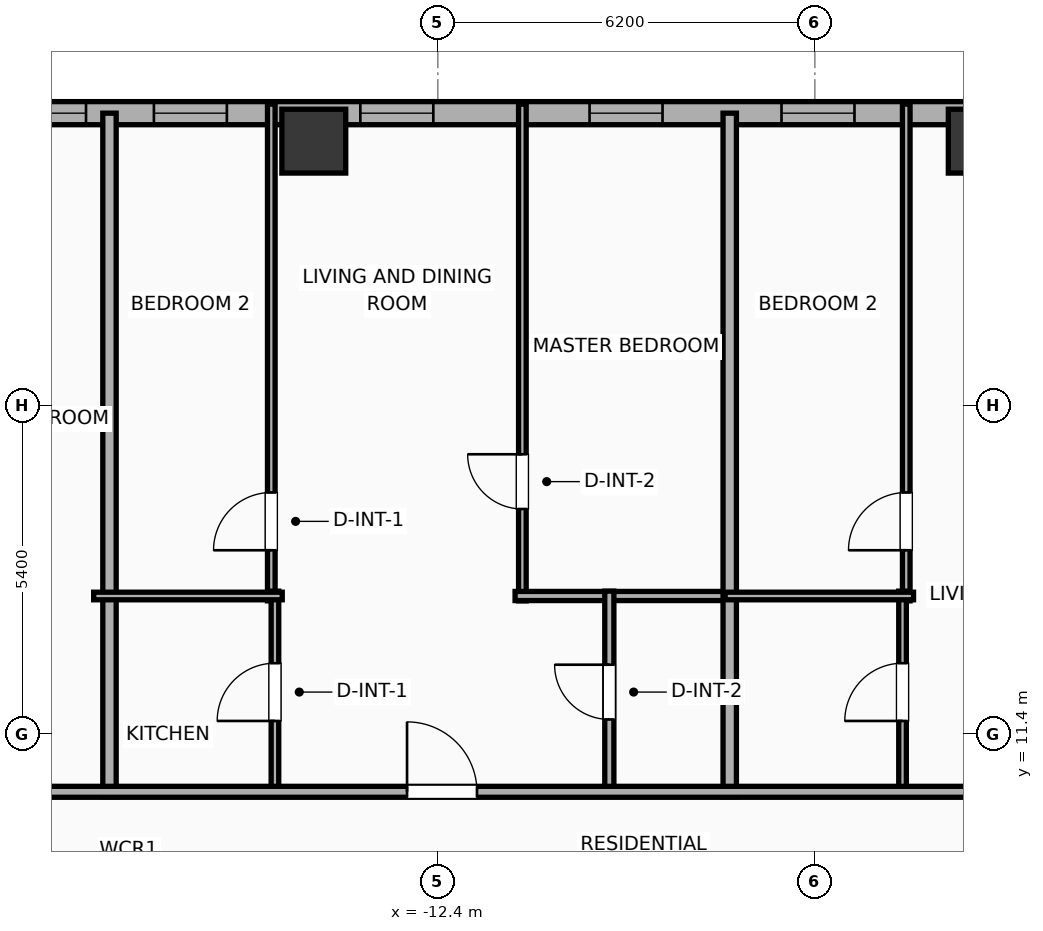
"""IFC4 building model, lengths in metres.
Left out: names, types, materials, properties, quantities, classifications, styles, units other than length and angle.
Written with IfcOpenShell. Run it as: python <this file> out.ifc"""

import sys

from ifc_helpers import new_model, si_unit, direction, frame, frame_2d, origin, origin_2d, place, context, subcontext, project, spatial, rectangle, hollow_rectangle, extrude, element, fill, save


model = new_model("IFC4")
c1 = context("Model", 3, precision=1e-05, world=origin(), true_north=direction((0.0, 1.0)))
c2 = subcontext(c1, "Body", "Model", "MODEL_VIEW")
j1 = project(units=[si_unit("LENGTHUNIT", "METRE"), si_unit("PLANEANGLEUNIT", "RADIAN")], contexts=[c1])
p1 = place(None, origin())
s1 = spatial("IfcSite", under=j1, at=p1, CompositionType="ELEMENT")
p2 = place(p1, origin())
s2 = spatial("IfcBuilding", under=s1, at=p2, CompositionType="ELEMENT")
p3 = place(p2, frame((0.0, 0.0, 93.6)))
s3 = spatial("IfcBuildingStorey", under=s2, at=p3, CompositionType="ELEMENT", Elevation=93.6)
for number, where, z_axis, x_axis in (
    (1, (-3.48, 21.15, 0.0), (0.0, 0.0, 1.0), (1.0, 0.0, 0.0)),
    (2, (-14.44, 21.15, 0.0), (0.0, 0.0, 1.0), (1.0, 0.0, 0.0)),
):
    element("IfcColumn", number, at=place(p3, frame(where, z_axis=z_axis, x_axis=x_axis)), inside=s3, PredefinedType="COLUMN", context=c2, shape_type="SweptSolid", body=[
        extrude(hollow_rectangle(XDim=1.05, YDim=1.05, WallThickness=0.036, at=origin_2d()), origin(), (0.0, 0.0, 1.0), 3.9),
    ])
p4 = place(p3, frame((-25.381, 21.61, 0.0), z_axis=(0.0, 0.0, 1.0), x_axis=(1.0, 0.0, 0.0)))
e3 = element("IfcWall", 3, at=p4, inside=s3, PredefinedType="ELEMENTEDWALL", context=c2, shape_type="SweptSolid", body=[
    extrude(rectangle(XDim=54.763, YDim=0.38, at=frame_2d((27.381, 0.0))), origin(), (0.0, 0.0, 1.0), 3.65),
])
p5 = place(p4, frame((4.795, 0.0, 0.75)))
e4 = element("IfcOpeningElement", 4, at=p5, cuts=e3, PredefinedType="OPENING", context=c2, shape_type="SweptSolid", body=[
    extrude(rectangle(XDim=2.4, YDim=2.1, at=frame_2d((1.2, 1.05))), frame((0.0, 0.2, 0.0), z_axis=(0.0, -1.0, 0.0), x_axis=(1.0, 0.0, 0.0)), (0.0, 0.0, 1.0), 0.4),
])
p6 = place(p4, frame((2.377, 0.0, 0.75)))
e5 = element("IfcOpeningElement", 5, at=p6, cuts=e3, PredefinedType="OPENING", context=c2, shape_type="SweptSolid", body=[
    extrude(rectangle(XDim=1.2, YDim=2.05, at=frame_2d((0.6, 1.025))), frame((0.0, 0.2, 0.0), z_axis=(0.0, -1.0, 0.0), x_axis=(1.0, 0.0, 0.0)), (0.0, 0.0, 1.0), 0.4),
])
p7 = place(p4, frame((11.707, 0.0, 0.75)))
e6 = element("IfcOpeningElement", 6, at=p7, cuts=e3, PredefinedType="OPENING", context=c2, shape_type="SweptSolid", body=[
    extrude(rectangle(XDim=1.2, YDim=2.05, at=frame_2d((0.6, 1.025))), frame((0.0, 0.2, 0.0), z_axis=(0.0, -1.0, 0.0), x_axis=(1.0, 0.0, 0.0)), (0.0, 0.0, 1.0), 0.4),
])
p8 = place(p4, frame((8.312, 0.0, 0.75)))
e7 = element("IfcOpeningElement", 7, at=p8, cuts=e3, PredefinedType="OPENING", context=c2, shape_type="SweptSolid", body=[
    extrude(rectangle(XDim=1.2, YDim=2.05, at=frame_2d((0.6, 1.025))), frame((0.0, 0.2, 0.0), z_axis=(0.0, -1.0, 0.0), x_axis=(1.0, 0.0, 0.0)), (0.0, 0.0, 1.0), 0.4),
])
p9 = place(p4, frame((15.476, 0.0, 0.75)))
e8 = element("IfcOpeningElement", 8, at=p9, cuts=e3, PredefinedType="OPENING", context=c2, shape_type="SweptSolid", body=[
    extrude(rectangle(XDim=1.2, YDim=2.05, at=frame_2d((0.6, 1.025))), frame((0.0, 0.2, 0.0), z_axis=(0.0, -1.0, 0.0), x_axis=(1.0, 0.0, 0.0)), (0.0, 0.0, 1.0), 0.4),
])
p10 = place(p4, frame((22.628, 0.0, 0.75)))
e9 = element("IfcOpeningElement", 9, at=p10, cuts=e3, PredefinedType="OPENING", context=c2, shape_type="SweptSolid", body=[
    extrude(rectangle(XDim=1.2, YDim=2.05, at=frame_2d((0.6, 1.025))), frame((0.0, 0.2, 0.0), z_axis=(0.0, -1.0, 0.0), x_axis=(1.0, 0.0, 0.0)), (0.0, 0.0, 1.0), 0.4),
])
p11 = place(p4, frame((18.633, 0.0, 0.75)))
e10 = element("IfcOpeningElement", 10, at=p11, cuts=e3, PredefinedType="OPENING", context=c2, shape_type="SweptSolid", body=[
    extrude(rectangle(XDim=1.2, YDim=2.05, at=frame_2d((0.6, 1.025))), frame((0.0, 0.2, 0.0), z_axis=(0.0, -1.0, 0.0), x_axis=(1.0, 0.0, 0.0)), (0.0, 0.0, 1.0), 0.4),
])
p12 = place(p4, frame((25.676, 0.0, 0.75)))
e11 = element("IfcOpeningElement", 11, at=p12, cuts=e3, PredefinedType="OPENING", context=c2, shape_type="SweptSolid", body=[
    extrude(rectangle(XDim=1.2, YDim=2.05, at=frame_2d((0.6, 1.025))), frame((0.0, 0.2, 0.0), z_axis=(0.0, -1.0, 0.0), x_axis=(1.0, 0.0, 0.0)), (0.0, 0.0, 1.0), 0.4),
])
p13 = place(p4, frame((30.881, 0.0, 0.75)))
e12 = element("IfcOpeningElement", 12, at=p13, cuts=e3, PredefinedType="OPENING", context=c2, shape_type="SweptSolid", body=[
    extrude(rectangle(XDim=1.2, YDim=2.05, at=frame_2d((0.6, 1.025))), frame((0.0, 0.2, 0.0), z_axis=(0.0, -1.0, 0.0), x_axis=(1.0, 0.0, 0.0)), (0.0, 0.0, 1.0), 0.4),
])
p14 = place(p4, frame((28.686, 0.0, 0.75)))
e13 = element("IfcOpeningElement", 13, at=p14, cuts=e3, PredefinedType="OPENING", context=c2, shape_type="SweptSolid", body=[
    extrude(rectangle(XDim=1.2, YDim=2.05, at=frame_2d((0.6, 1.025))), frame((0.0, 0.2, 0.0), z_axis=(0.0, -1.0, 0.0), x_axis=(1.0, 0.0, 0.0)), (0.0, 0.0, 1.0), 0.4),
])
p15 = place(p4, frame((35.876, 0.0, 0.75)))
e14 = element("IfcOpeningElement", 14, at=p15, cuts=e3, PredefinedType="OPENING", context=c2, shape_type="SweptSolid", body=[
    extrude(rectangle(XDim=1.2, YDim=2.05, at=frame_2d((0.6, 1.025))), frame((0.0, 0.2, 0.0), z_axis=(0.0, -1.0, 0.0), x_axis=(1.0, 0.0, 0.0)), (0.0, 0.0, 1.0), 0.4),
])
p16 = place(p4, frame((40.976, 0.0, 0.75)))
e15 = element("IfcOpeningElement", 15, at=p16, cuts=e3, PredefinedType="OPENING", context=c2, shape_type="SweptSolid", body=[
    extrude(rectangle(XDim=1.2, YDim=2.05, at=frame_2d((0.6, 1.025))), frame((0.0, 0.2, 0.0), z_axis=(0.0, -1.0, 0.0), x_axis=(1.0, 0.0, 0.0)), (0.0, 0.0, 1.0), 0.4),
])
p17 = place(p4, frame((46.076, 0.0, 0.75)))
e16 = element("IfcOpeningElement", 16, at=p17, cuts=e3, PredefinedType="OPENING", context=c2, shape_type="SweptSolid", body=[
    extrude(rectangle(XDim=1.2, YDim=2.05, at=frame_2d((0.6, 1.025))), frame((0.0, 0.2, 0.0), z_axis=(0.0, -1.0, 0.0), x_axis=(1.0, 0.0, 0.0)), (0.0, 0.0, 1.0), 0.4),
])
p18 = place(p4, frame((50.527, 0.0, 0.75)))
e17 = element("IfcOpeningElement", 17, at=p18, cuts=e3, PredefinedType="OPENING", context=c2, shape_type="SweptSolid", body=[
    extrude(rectangle(XDim=1.2, YDim=2.05, at=frame_2d((0.6, 1.025))), frame((0.0, 0.2, 0.0), z_axis=(0.0, -1.0, 0.0), x_axis=(1.0, 0.0, 0.0)), (0.0, 0.0, 1.0), 0.4),
])
p19 = place(p3, frame((-17.8, 10.37, 0.0), z_axis=(0.0, 0.0, 1.0), x_axis=(0.0, 1.0, 0.0)))
e18 = element("IfcWall", 18, at=p19, inside=s3, PredefinedType="PARTITIONING", context=c2, shape_type="SweptSolid", body=[
    extrude(rectangle(XDim=11.24, YDim=0.22, at=frame_2d((5.62, 0.0))), origin(), (0.0, 0.0, 1.0), 3.65),
])
p20 = place(p3, frame((-15.139, 13.59, 0.0), z_axis=(0.0, 0.0, 1.0), x_axis=(0.0, 1.0, 0.0)))
e19 = element("IfcWall", 19, at=p20, inside=s3, PredefinedType="PARTITIONING", context=c2, shape_type="SweptSolid", body=[
    extrude(rectangle(XDim=8.17, YDim=0.125, at=frame_2d((4.085, 0.0))), origin(), (0.0, 0.0, 1.0), 3.04),
])
p21 = place(p20, frame((0.832, 0.0, 0.0)))
e20 = element("IfcOpeningElement", 20, at=p21, cuts=e19, PredefinedType="OPENING", context=c2, shape_type="SweptSolid", body=[
    extrude(rectangle(XDim=0.95, YDim=2.05, at=frame_2d((0.475, 1.025))), frame((0.0, 0.073, 0.0), z_axis=(0.0, -1.0, 0.0), x_axis=(1.0, 0.0, 0.0)), (0.0, 0.0, 1.0), 0.145),
])
p22 = place(p3, frame((-11.01, 13.59, 0.0), z_axis=(0.0, 0.0, 1.0), x_axis=(0.0, 1.0, 0.0)))
e21 = element("IfcWall", 21, at=p22, inside=s3, PredefinedType="PARTITIONING", context=c2, shape_type="SweptSolid", body=[
    extrude(rectangle(XDim=8.17, YDim=0.125, at=frame_2d((4.085, 0.0))), origin(), (0.0, 0.0, 1.0), 3.65),
])
p23 = place(p22, frame((1.511, 0.0, 0.0)))
e22 = element("IfcOpeningElement", 22, at=p23, cuts=e21, PredefinedType="OPENING", context=c2, shape_type="SweptSolid", body=[
    extrude(rectangle(XDim=0.9, YDim=2.05, at=frame_2d((0.45, 1.025))), frame((0.0, 0.073, 0.0), z_axis=(0.0, -1.0, 0.0), x_axis=(1.0, 0.0, 0.0)), (0.0, 0.0, 1.0), 0.145),
])
p24 = place(p3, frame((-11.13, 13.67, 0.0), z_axis=(0.0, 0.0, 1.0), x_axis=(1.0, 0.0, 0.0)))
e23 = element("IfcWall", 23, at=p24, inside=s3, PredefinedType="PLUMBINGWALL", context=c2, shape_type="SweptSolid", body=[
    extrude(rectangle(XDim=3.605, YDim=0.15, at=frame_2d((1.802, 0.0))), origin(), (0.0, 0.0, 1.0), 3.65),
])
p25 = place(p3, frame((-15.079, 10.43, 0.0), z_axis=(0.0, 0.0, 1.0), x_axis=(0.0, 1.0, 0.0)))
e24 = element("IfcWall", 24, at=p25, inside=s3, PredefinedType="PARTITIONING", context=c2, shape_type="SweptSolid", body=[
    extrude(rectangle(XDim=3.32, YDim=0.125, at=frame_2d((1.66, 0.0))), origin(), (0.0, 0.0, 1.0), 3.04),
])
p26 = place(p25, frame((1.185, 0.0, 0.0)))
e25 = element("IfcOpeningElement", 25, at=p26, cuts=e24, PredefinedType="OPENING", context=c2, shape_type="SweptSolid", body=[
    extrude(rectangle(XDim=0.95, YDim=2.05, at=frame_2d((0.475, 1.025))), frame((0.0, 0.073, 0.0), z_axis=(0.0, -1.0, 0.0), x_axis=(1.0, 0.0, 0.0)), (0.0, 0.0, 1.0), 0.145),
])
p27 = place(p3, frame((-18.06, 13.67, 0.0), z_axis=(0.0, 0.0, 1.0), x_axis=(1.0, 0.0, 0.0)))
e26 = element("IfcWall", 26, at=p27, inside=s3, PredefinedType="PARTITIONING", context=c2, shape_type="SweptSolid", body=[
    extrude(rectangle(XDim=3.101, YDim=0.125, at=frame_2d((1.551, 0.0))), origin(), (0.0, 0.0, 1.0), 3.65),
])
p28 = place(p3, frame((-9.58, 10.43, 0.0), z_axis=(0.0, 0.0, 1.0), x_axis=(0.0, 1.0, 0.0)))
e27 = element("IfcWall", 27, at=p28, inside=s3, PredefinedType="PLUMBINGWALL", context=c2, shape_type="SweptSolid", body=[
    extrude(rectangle(XDim=3.32, YDim=0.15, at=frame_2d((1.66, 0.0))), origin(), (0.0, 0.0, 1.0), 3.65),
])
p29 = place(p28, frame((1.21, 0.0, 0.0)))
e28 = element("IfcOpeningElement", 28, at=p29, cuts=e27, PredefinedType="OPENING", context=c2, shape_type="SweptSolid", body=[
    extrude(rectangle(XDim=0.9, YDim=2.05, at=frame_2d((0.45, 1.025))), frame((0.0, 0.085, 0.0), z_axis=(0.0, -1.0, 0.0), x_axis=(1.0, 0.0, 0.0)), (0.0, 0.0, 1.0), 0.17),
])
p30 = place(p3, frame((-7.6, 10.37, 0.0), z_axis=(0.0, 0.0, 1.0), x_axis=(0.0, 1.0, 0.0)))
e29 = element("IfcWall", 29, at=p30, inside=s3, PredefinedType="PARTITIONING", context=c2, shape_type="SweptSolid", body=[
    extrude(rectangle(XDim=11.24, YDim=0.22, at=frame_2d((5.62, 0.0))), origin(), (0.0, 0.0, 1.0), 3.65),
])
p31 = place(p3, frame((-4.697, 13.59, 0.0), z_axis=(0.0, 0.0, 1.0), x_axis=(0.0, 1.0, 0.0)))
e30 = element("IfcWall", 30, at=p31, inside=s3, PredefinedType="PARTITIONING", context=c2, shape_type="SweptSolid", body=[
    extrude(rectangle(XDim=8.17, YDim=0.125, at=frame_2d((4.085, 0.0))), origin(), (0.0, 0.0, 1.0), 3.65),
])
p32 = place(p31, frame((0.832, 0.0, 0.0)))
e31 = element("IfcOpeningElement", 31, at=p32, cuts=e30, PredefinedType="OPENING", context=c2, shape_type="SweptSolid", body=[
    extrude(rectangle(XDim=0.95, YDim=2.05, at=frame_2d((0.475, 1.025))), frame((0.0, 0.073, 0.0), z_axis=(0.0, -1.0, 0.0), x_axis=(1.0, 0.0, 0.0)), (0.0, 0.0, 1.0), 0.145),
])
p33 = place(p3, frame((-4.758, 10.43, 0.0), z_axis=(0.0, 0.0, 1.0), x_axis=(0.0, 1.0, 0.0)))
e32 = element("IfcWall", 32, at=p33, inside=s3, PredefinedType="PARTITIONING", context=c2, shape_type="SweptSolid", body=[
    extrude(rectangle(XDim=3.32, YDim=0.125, at=frame_2d((1.66, 0.0))), origin(), (0.0, 0.0, 1.0), 3.65),
])
p34 = place(p33, frame((1.185, 0.0, 0.0)))
e33 = element("IfcOpeningElement", 33, at=p34, cuts=e32, PredefinedType="OPENING", context=c2, shape_type="SweptSolid", body=[
    extrude(rectangle(XDim=0.95, YDim=2.05, at=frame_2d((0.475, 1.025))), frame((0.0, 0.073, 0.0), z_axis=(0.0, -1.0, 0.0), x_axis=(1.0, 0.0, 0.0)), (0.0, 0.0, 1.0), 0.145),
])
p35 = place(p3, frame((-7.675, 13.67, 0.0), z_axis=(0.0, 0.0, 1.0), x_axis=(1.0, 0.0, 0.0)))
e34 = element("IfcWall", 34, at=p35, inside=s3, PredefinedType="PARTITIONING", context=c2, shape_type="SweptSolid", body=[
    extrude(rectangle(XDim=3.098, YDim=0.125, at=frame_2d((1.549, 0.0))), origin(), (0.0, 0.0, 1.0), 3.65),
])
p36 = place(p3, frame((-29.21, 10.45, 0.0), z_axis=(0.0, 0.0, 1.0), x_axis=(1.0, 0.0, 0.0)))
e35 = element("IfcWall", 35, at=p36, inside=s3, PredefinedType="PARTITIONING", context=c2, shape_type="SweptSolid", body=[
    extrude(rectangle(XDim=62.42, YDim=0.18, at=frame_2d((31.21, 0.0))), origin(), (0.0, 0.0, 1.0), 3.65),
])
p37 = place(p36, frame((2.534, 0.0, 0.0)))
e36 = element("IfcOpeningElement", 36, at=p37, cuts=e35, PredefinedType="OPENING", context=c2, shape_type="SweptSolid", body=[
    extrude(rectangle(XDim=0.9, YDim=2.05, at=frame_2d((0.45, 1.025))), frame((0.0, 0.1, 0.0), z_axis=(0.0, -1.0, 0.0), x_axis=(1.0, 0.0, 0.0)), (0.0, 0.0, 1.0), 0.2),
])
p38 = place(p36, frame((9.056, 0.0, 0.0)))
e37 = element("IfcOpeningElement", 37, at=p38, cuts=e35, PredefinedType="OPENING", context=c2, shape_type="SweptSolid", body=[
    extrude(rectangle(XDim=1.15, YDim=2.05, at=frame_2d((0.575, 1.025))), frame((0.0, 0.1, 0.0), z_axis=(0.0, -1.0, 0.0), x_axis=(1.0, 0.0, 0.0)), (0.0, 0.0, 1.0), 0.2),
])
p39 = place(p36, frame((16.303, 0.0, 0.0)))
e38 = element("IfcOpeningElement", 38, at=p39, cuts=e35, PredefinedType="OPENING", context=c2, shape_type="SweptSolid", body=[
    extrude(rectangle(XDim=1.15, YDim=2.05, at=frame_2d((0.575, 1.025))), frame((0.0, 0.1, 0.0), z_axis=(0.0, -1.0, 0.0), x_axis=(1.0, 0.0, 0.0)), (0.0, 0.0, 1.0), 0.2),
])
p40 = place(p36, frame((26.565, 0.0, 0.0)))
e39 = element("IfcOpeningElement", 39, at=p40, cuts=e35, PredefinedType="OPENING", context=c2, shape_type="SweptSolid", body=[
    extrude(rectangle(XDim=1.15, YDim=2.05, at=frame_2d((0.575, 1.025))), frame((0.0, 0.1, 0.0), z_axis=(0.0, -1.0, 0.0), x_axis=(1.0, 0.0, 0.0)), (0.0, 0.0, 1.0), 0.2),
])
p41 = place(p36, frame((36.677, 0.0, 0.0)))
e40 = element("IfcOpeningElement", 40, at=p41, cuts=e35, PredefinedType="OPENING", context=c2, shape_type="SweptSolid", body=[
    extrude(rectangle(XDim=1.15, YDim=2.05, at=frame_2d((0.575, 1.025))), frame((0.0, 0.1, 0.0), z_axis=(0.0, -1.0, 0.0), x_axis=(1.0, 0.0, 0.0)), (0.0, 0.0, 1.0), 0.2),
])
p42 = place(p36, frame((46.939, 0.0, 0.0)))
e41 = element("IfcOpeningElement", 41, at=p42, cuts=e35, PredefinedType="OPENING", context=c2, shape_type="SweptSolid", body=[
    extrude(rectangle(XDim=1.15, YDim=2.05, at=frame_2d((0.575, 1.025))), frame((0.0, 0.1, 0.0), z_axis=(0.0, -1.0, 0.0), x_axis=(1.0, 0.0, 0.0)), (0.0, 0.0, 1.0), 0.2),
])
p43 = place(p36, frame((57.245, 0.0, 0.0)))
e42 = element("IfcOpeningElement", 42, at=p43, cuts=e35, PredefinedType="OPENING", context=c2, shape_type="SweptSolid", body=[
    extrude(rectangle(XDim=1.15, YDim=2.05, at=frame_2d((0.575, 1.025))), frame((0.0, 0.1, 0.0), z_axis=(0.0, -1.0, 0.0), x_axis=(1.0, 0.0, 0.0)), (0.0, 0.0, 1.0), 0.2),
])
p44 = place(p5, origin())
e43 = element("IfcWindow", 43, at=p44, inside=s3, PartitioningType="SINGLE_PANEL", PredefinedType="WINDOW", context=c2, shape_type="SweptSolid", body=[
    extrude(rectangle(XDim=2.4, YDim=2.1, at=frame_2d((1.2, 1.05))), frame((0.0, 0.03, 0.0), z_axis=(0.0, -1.0, 0.0), x_axis=(1.0, 0.0, 0.0)), (0.0, 0.0, 1.0), 0.06),
])
fill(e4, e43)
p45 = place(p7, origin())
e44 = element("IfcWindow", 44, at=p45, inside=s3, PartitioningType="SINGLE_PANEL", PredefinedType="WINDOW", context=c2, shape_type="SweptSolid", body=[
    extrude(rectangle(XDim=1.2, YDim=2.05, at=frame_2d((0.6, 1.025))), frame((0.0, 0.03, 0.0), z_axis=(0.0, -1.0, 0.0), x_axis=(1.0, 0.0, 0.0)), (0.0, 0.0, 1.0), 0.06),
])
fill(e6, e44)
p46 = place(p8, origin())
e45 = element("IfcWindow", 45, at=p46, inside=s3, PartitioningType="SINGLE_PANEL", PredefinedType="WINDOW", context=c2, shape_type="SweptSolid", body=[
    extrude(rectangle(XDim=1.2, YDim=2.05, at=frame_2d((0.6, 1.025))), frame((0.0, 0.03, 0.0), z_axis=(0.0, -1.0, 0.0), x_axis=(1.0, 0.0, 0.0)), (0.0, 0.0, 1.0), 0.06),
])
fill(e7, e45)
p47 = place(p9, origin())
e46 = element("IfcWindow", 46, at=p47, inside=s3, PartitioningType="SINGLE_PANEL", PredefinedType="WINDOW", context=c2, shape_type="SweptSolid", body=[
    extrude(rectangle(XDim=1.2, YDim=2.05, at=frame_2d((0.6, 1.025))), frame((0.0, 0.03, 0.0), z_axis=(0.0, -1.0, 0.0), x_axis=(1.0, 0.0, 0.0)), (0.0, 0.0, 1.0), 0.06),
])
fill(e8, e46)
p48 = place(p11, origin())
e47 = element("IfcWindow", 47, at=p48, inside=s3, PartitioningType="SINGLE_PANEL", PredefinedType="WINDOW", context=c2, shape_type="SweptSolid", body=[
    extrude(rectangle(XDim=1.2, YDim=2.05, at=frame_2d((0.6, 1.025))), frame((0.0, 0.03, 0.0), z_axis=(0.0, -1.0, 0.0), x_axis=(1.0, 0.0, 0.0)), (0.0, 0.0, 1.0), 0.06),
])
fill(e10, e47)
p49 = place(p21, origin())
e48 = element("IfcDoor", 48, at=p49, inside=s3, OperationType="SINGLE_SWING_LEFT", PredefinedType="DOOR", context=c2, shape_type="SweptSolid", body=[
    extrude(rectangle(XDim=0.95, YDim=2.05, at=frame_2d((0.475, 1.025))), frame((0.0, 0.025, 0.0), z_axis=(0.0, -1.0, 0.0), x_axis=(1.0, 0.0, 0.0)), (0.0, 0.0, 1.0), 0.05),
])
fill(e20, e48)
p50 = place(p23, origin())
e49 = element("IfcDoor", 49, at=p50, inside=s3, OperationType="SINGLE_SWING_RIGHT", PredefinedType="DOOR", context=c2, shape_type="SweptSolid", body=[
    extrude(rectangle(XDim=0.9, YDim=2.05, at=frame_2d((0.45, 1.025))), frame((0.0, 0.025, 0.0), z_axis=(0.0, -1.0, 0.0), x_axis=(1.0, 0.0, 0.0)), (0.0, 0.0, 1.0), 0.05),
])
fill(e22, e49)
p51 = place(p26, origin())
e50 = element("IfcDoor", 50, at=p51, inside=s3, OperationType="SINGLE_SWING_LEFT", PredefinedType="DOOR", context=c2, shape_type="SweptSolid", body=[
    extrude(rectangle(XDim=0.95, YDim=2.05, at=frame_2d((0.475, 1.025))), frame((0.0, 0.025, 0.0), z_axis=(0.0, -1.0, 0.0), x_axis=(1.0, 0.0, 0.0)), (0.0, 0.0, 1.0), 0.05),
])
fill(e25, e50)
p52 = place(p29, origin())
e51 = element("IfcDoor", 51, at=p52, inside=s3, OperationType="SINGLE_SWING_RIGHT", PredefinedType="DOOR", context=c2, shape_type="SweptSolid", body=[
    extrude(rectangle(XDim=0.9, YDim=2.05, at=frame_2d((0.45, 1.025))), frame((0.0, 0.025, 0.0), z_axis=(0.0, -1.0, 0.0), x_axis=(1.0, 0.0, 0.0)), (0.0, 0.0, 1.0), 0.05),
])
fill(e28, e51)
p53 = place(p32, origin())
e52 = element("IfcDoor", 52, at=p53, inside=s3, OperationType="SINGLE_SWING_LEFT", PredefinedType="DOOR", context=c2, shape_type="SweptSolid", body=[
    extrude(rectangle(XDim=0.95, YDim=2.05, at=frame_2d((0.475, 1.025))), frame((0.0, 0.025, 0.0), z_axis=(0.0, -1.0, 0.0), x_axis=(1.0, 0.0, 0.0)), (0.0, 0.0, 1.0), 0.05),
])
fill(e31, e52)
p54 = place(p34, origin())
e53 = element("IfcDoor", 53, at=p54, inside=s3, OperationType="SINGLE_SWING_LEFT", PredefinedType="DOOR", context=c2, shape_type="SweptSolid", body=[
    extrude(rectangle(XDim=0.95, YDim=2.05, at=frame_2d((0.475, 1.025))), frame((0.0, 0.025, 0.0), z_axis=(0.0, -1.0, 0.0), x_axis=(1.0, 0.0, 0.0)), (0.0, 0.0, 1.0), 0.05),
])
fill(e33, e53)
p55 = place(p39, origin())
e54 = element("IfcDoor", 54, at=p55, inside=s3, OperationType="SINGLE_SWING_LEFT", PredefinedType="DOOR", context=c2, shape_type="SweptSolid", body=[
    extrude(rectangle(XDim=1.15, YDim=2.05, at=frame_2d((0.575, 1.025))), frame((0.0, 0.025, 0.0), z_axis=(0.0, -1.0, 0.0), x_axis=(1.0, 0.0, 0.0)), (0.0, 0.0, 1.0), 0.05),
])
fill(e38, e54)
save(model, sys.argv[1])
